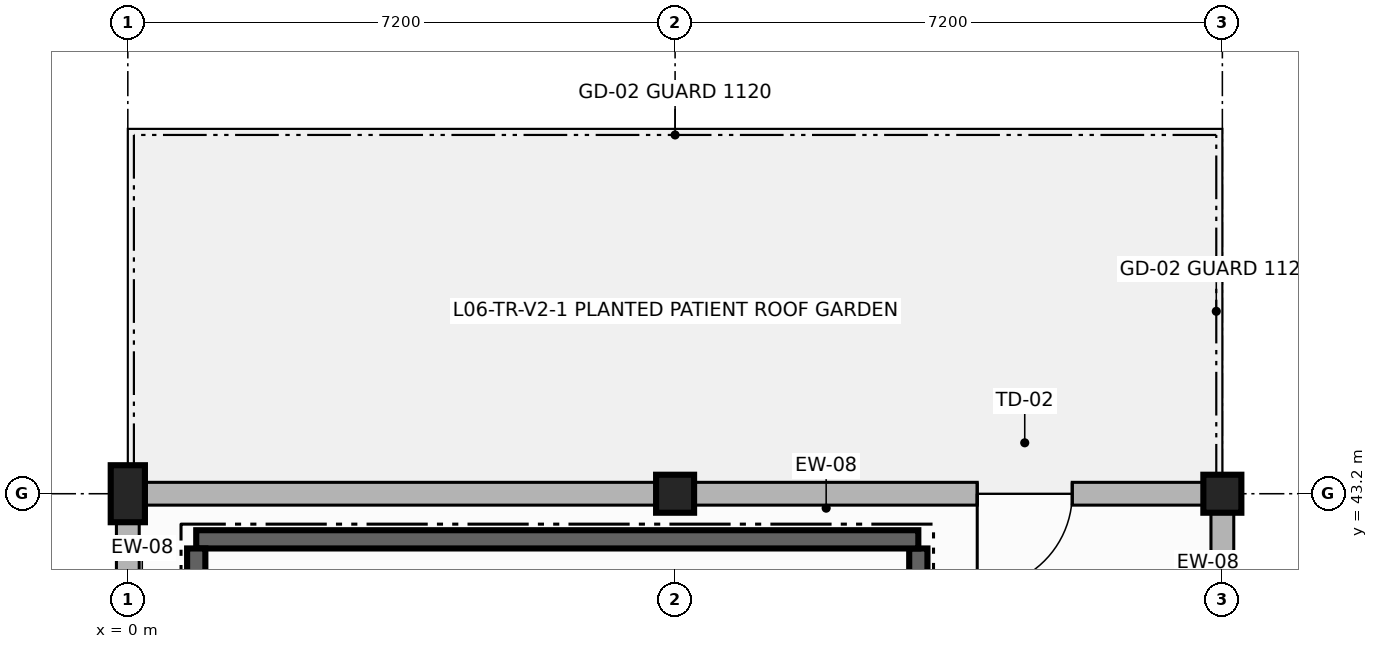
"""IFC4 building model, lengths in metres.
Left out: names, types, materials, properties, quantities, classifications, styles, units other than length and angle.
Written with IfcOpenShell. Run it as: python <this file> out.ifc"""

import sys

from ifc_helpers import new_model, si_unit, direction, frame, frame_2d, origin, origin_2d, place, context, subcontext, project, spatial, rectangle, extrude, element, fill, save


model = new_model("IFC4")
c1 = context("Model", 3, precision=1e-05, world=origin(), true_north=direction((0.0, 1.0)))
c2 = subcontext(c1, "Body", "Model", "MODEL_VIEW")
j1 = project(units=[si_unit("LENGTHUNIT", "METRE"), si_unit("PLANEANGLEUNIT", "RADIAN")], contexts=[c1])
p1 = place(None, origin())
s1 = spatial("IfcSite", under=j1, at=p1, CompositionType="ELEMENT")
p2 = place(p1, origin())
s2 = spatial("IfcBuilding", under=s1, at=p2, CompositionType="ELEMENT")
p3 = place(p2, frame((0.0, 0.0, 23.4)))
s3 = spatial("IfcBuildingStorey", under=s2, at=p3, CompositionType="ELEMENT", Elevation=23.4)
p4 = place(p3, frame((0.0, 43.2, 0.0), z_axis=(0.0, 0.0, 1.0), x_axis=(1.0, 0.0, 0.0)))
e1 = element("IfcColumn", 1, at=p4, inside=s3, PredefinedType="PILASTER", context=c2, shape_type="SweptSolid", body=[
    extrude(rectangle(XDim=0.45, YDim=0.75, at=origin_2d()), origin(), (0.0, 0.0, 1.0), 3.36),
])
for number, where, z_axis, x_axis in (
    (2, (7.2, 43.2, 0.0), (0.0, 0.0, 1.0), (1.0, 0.0, 0.0)),
    (3, (14.4, 43.2, 0.0), (0.0, 0.0, 1.0), (1.0, 0.0, 0.0)),
):
    element("IfcColumn", number, at=place(p3, frame(where, z_axis=z_axis, x_axis=x_axis)), inside=s3, PredefinedType="COLUMN", context=c2, shape_type="SweptSolid", body=[
        extrude(rectangle(XDim=0.5, YDim=0.5, at=origin_2d()), origin(), (0.0, 0.0, 1.0), 3.36),
    ])
p5 = place(p3, frame((14.4, 36.0, 0.0), z_axis=(0.0, 0.0, 1.0), x_axis=(0.0, 1.0, 0.0)))
e4 = element("IfcWall", 4, at=p5, inside=s3, PredefinedType="SOLIDWALL", context=c2, shape_type="SweptSolid", body=[
    extrude(rectangle(XDim=7.2, YDim=0.3, at=frame_2d((3.6, 0.0))), origin(), (0.0, 0.0, 1.0), 2.69),
])
p6 = place(p5, frame((2.925, 0.0, 0.85)))
e5 = element("IfcOpeningElement", 5, at=p6, cuts=e4, PredefinedType="OPENING", context=c2, shape_type="SweptSolid", body=[
    extrude(rectangle(XDim=1.35, YDim=1.6, at=frame_2d((0.675, 0.8))), frame((0.0, 0.16, 0.0), z_axis=(0.0, -1.0, 0.0), x_axis=(1.0, 0.0, 0.0)), (0.0, 0.0, 1.0), 0.32),
])
p7 = place(p3, frame((14.4, 43.2, 0.0), z_axis=(0.0, 0.0, 1.0), x_axis=(-1.0, 0.0, 0.0)))
e6 = element("IfcWall", 6, at=p7, inside=s3, PredefinedType="SOLIDWALL", context=c2, shape_type="SweptSolid", body=[
    extrude(rectangle(XDim=7.2, YDim=0.3, at=frame_2d((3.6, 0.0))), origin(), (0.0, 0.0, 1.0), 2.69),
])
p8 = place(p7, frame((1.975, 0.0, 0.0)))
e7 = element("IfcOpeningElement", 7, at=p8, cuts=e6, PredefinedType="OPENING", context=c2, shape_type="SweptSolid", body=[
    extrude(rectangle(XDim=1.25, YDim=2.25, at=frame_2d((0.625, 1.125))), frame((0.0, 0.16, 0.0), z_axis=(0.0, -1.0, 0.0), x_axis=(1.0, 0.0, 0.0)), (0.0, 0.0, 1.0), 0.32),
])
p9 = place(p3, frame((7.2, 43.2, 0.0), z_axis=(0.0, 0.0, 1.0), x_axis=(-1.0, 0.0, 0.0)))
e8 = element("IfcWall", 8, at=p9, inside=s3, PredefinedType="SOLIDWALL", context=c2, shape_type="SweptSolid", body=[
    extrude(rectangle(XDim=7.2, YDim=0.3, at=frame_2d((3.6, 0.0))), origin(), (0.0, 0.0, 1.0), 2.69),
])
p10 = place(p3, frame((0.0, 43.2, 0.0), z_axis=(0.0, 0.0, 1.0), x_axis=(0.0, -1.0, 0.0)))
e9 = element("IfcWall", 9, at=p10, inside=s3, PredefinedType="SOLIDWALL", context=c2, shape_type="SweptSolid", body=[
    extrude(rectangle(XDim=7.2, YDim=0.3, at=frame_2d((3.6, 0.0))), origin(), (0.0, 0.0, 1.0), 2.69),
])
p11 = place(p10, frame((2.525, 0.0, 0.85)))
e10 = element("IfcOpeningElement", 10, at=p11, cuts=e9, PredefinedType="OPENING", context=c2, shape_type="SweptSolid", body=[
    extrude(rectangle(XDim=1.35, YDim=1.6, at=frame_2d((0.675, 0.8))), frame((0.0, 0.16, 0.0), z_axis=(0.0, -1.0, 0.0), x_axis=(1.0, 0.0, 0.0)), (0.0, 0.0, 1.0), 0.32),
])
p12 = place(p3, frame((10.4, 36.92, 0.0), z_axis=(0.0, 0.0, 1.0), x_axis=(0.0, 1.0, 0.0)))
e11 = element("IfcWall", 11, at=p12, inside=s3, PredefinedType="SHEAR", context=c2, shape_type="SweptSolid", body=[
    extrude(rectangle(XDim=5.56, YDim=0.24, at=frame_2d((2.78, 0.0))), origin(), (0.0, 0.0, 1.0), 3.36),
])
p13 = place(p12, frame((4.09, 0.0, 0.0)))
e12 = element("IfcOpeningElement", 12, at=p13, cuts=e11, PredefinedType="OPENING", context=c2, shape_type="SweptSolid", body=[
    extrude(rectangle(XDim=1.15, YDim=2.2, at=frame_2d((0.575, 1.1))), frame((0.0, 0.13, 0.0), z_axis=(0.0, -1.0, 0.0), x_axis=(1.0, 0.0, 0.0)), (0.0, 0.0, 1.0), 0.26),
])
p14 = place(p3, frame((10.4, 42.6, 0.0), z_axis=(0.0, 0.0, 1.0), x_axis=(-1.0, 0.0, 0.0)))
e13 = element("IfcWall", 13, at=p14, inside=s3, PredefinedType="SHEAR", context=c2, shape_type="SweptSolid", body=[
    extrude(rectangle(XDim=9.5, YDim=0.24, at=frame_2d((4.75, 0.0))), origin(), (0.0, 0.0, 1.0), 3.36),
])
p15 = place(p3, frame((0.9, 42.48, 0.0), z_axis=(0.0, 0.0, 1.0), x_axis=(0.0, -1.0, 0.0)))
e14 = element("IfcWall", 14, at=p15, inside=s3, PredefinedType="SHEAR", context=c2, shape_type="SweptSolid", body=[
    extrude(rectangle(XDim=5.56, YDim=0.24, at=frame_2d((2.78, 0.0))), origin(), (0.0, 0.0, 1.0), 3.36),
])
p16 = place(p8, origin())
e15 = element("IfcDoor", 15, at=p16, inside=s3, OperationType="SINGLE_SWING_RIGHT", PredefinedType="DOOR", context=c2, shape_type="SweptSolid", body=[
    extrude(rectangle(XDim=1.25, YDim=2.25, at=frame_2d((0.625, 1.125))), frame((0.0, 0.025, 0.0), z_axis=(0.0, -1.0, 0.0), x_axis=(1.0, 0.0, 0.0)), (0.0, 0.0, 1.0), 0.05),
])
fill(e7, e15)
save(model, sys.argv[1])
